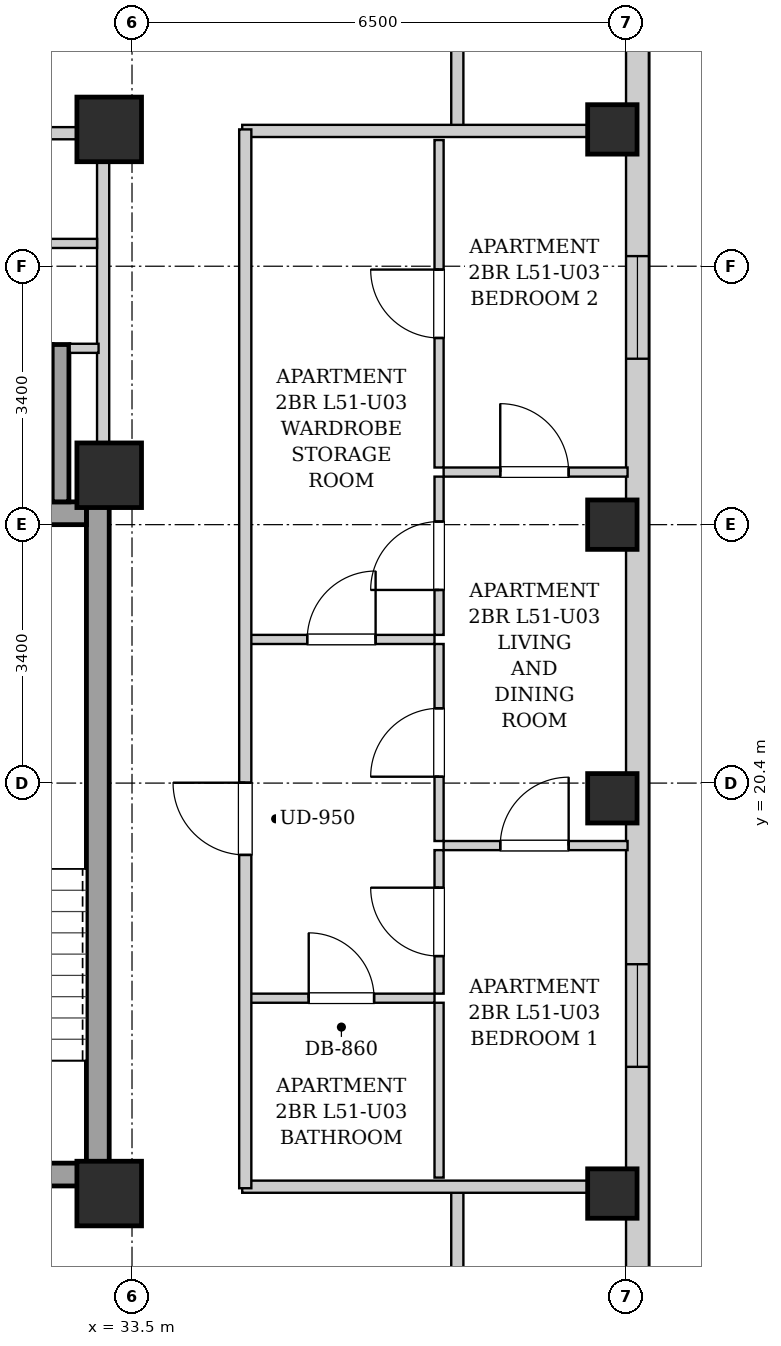
"""IFC4 building model, lengths in metres.
Left out: names, types, materials, properties, quantities, classifications, styles, units other than length and angle.
Written with IfcOpenShell. Run it as: python <this file> out.ifc"""

import sys

from ifc_helpers import new_model, si_unit, direction, frame, frame_2d, origin, origin_2d, place, context, subcontext, project, spatial, rectangle, extrude, element, fill, save


model = new_model("IFC4")
c1 = context("Model", 3, precision=1e-05, world=origin(), true_north=direction((0.0, 1.0)))
c2 = subcontext(c1, "Body", "Model", "MODEL_VIEW")
j1 = project(units=[si_unit("LENGTHUNIT", "METRE"), si_unit("PLANEANGLEUNIT", "RADIAN")], contexts=[c1])
p1 = place(None, origin())
s1 = spatial("IfcSite", under=j1, at=p1, CompositionType="ELEMENT")
p2 = place(p1, origin())
s2 = spatial("IfcBuilding", under=s1, at=p2, CompositionType="ELEMENT")
p3 = place(p2, frame((0.0, 0.0, 177.7)))
s3 = spatial("IfcBuildingStorey", under=s2, at=p3, CompositionType="ELEMENT", Elevation=177.7)
for number, where, z_axis, x_axis in (
    (1, (39.82, 15.0, 0.0), (0.0, 0.0, 1.0), (1.0, 0.0, 0.0)),
    (2, (39.82, 20.2, 0.0), (0.0, 0.0, 1.0), (1.0, 0.0, 0.0)),
    (3, (39.82, 23.8, 0.0), (0.0, 0.0, 1.0), (1.0, 0.0, 0.0)),
    (4, (39.82, 29.0, 0.0), (0.0, 0.0, 1.0), (1.0, 0.0, 0.0)),
):
    element("IfcColumn", number, at=place(p3, frame(where, z_axis=z_axis, x_axis=x_axis)), inside=s3, PredefinedType="COLUMN", context=c2, shape_type="SweptSolid", body=[
        extrude(rectangle(XDim=0.65, YDim=0.65, at=origin_2d()), origin(), (0.0, 0.0, 1.0), 3.3),
    ])
for number, where, z_axis, x_axis in (
    (5, (33.2, 15.0, 0.0), (0.0, 0.0, 1.0), (1.0, 0.0, 0.0)),
    (6, (33.2, 29.0, 0.0), (0.0, 0.0, 1.0), (1.0, 0.0, 0.0)),
    (7, (33.2, 24.45, 0.0), (0.0, 0.0, 1.0), (1.0, 0.0, 0.0)),
):
    element("IfcColumn", number, at=place(p3, frame(where, z_axis=z_axis, x_axis=x_axis)), inside=s3, PredefinedType="COLUMN", context=c2, shape_type="SweptSolid", body=[
        extrude(rectangle(XDim=0.85, YDim=0.85, at=origin_2d()), origin(), (0.0, 0.0, 1.0), 3.3),
    ])
p4 = place(p3, frame((40.15, 37.7, 0.0), z_axis=(0.0, 0.0, 1.0), x_axis=(0.0, -1.0, 0.0)))
e8 = element("IfcWall", 8, at=p4, inside=s3, PredefinedType="SOLIDWALL", context=c2, shape_type="SweptSolid", body=[
    extrude(rectangle(XDim=31.4, YDim=0.3, at=frame_2d((15.7, 0.0))), origin(), (0.0, 0.0, 1.0), 3.04),
])
p5 = place(p4, frame((28.396, 0.0, 0.55)))
e9 = element("IfcOpeningElement", 9, at=p5, cuts=e8, PredefinedType="OPENING", context=c2, shape_type="SweptSolid", body=[
    extrude(rectangle(XDim=1.35, YDim=1.2, at=frame_2d((0.675, 0.6))), frame((0.0, 0.16, 0.0), z_axis=(0.0, -1.0, 0.0), x_axis=(1.0, 0.0, 0.0)), (0.0, 0.0, 1.0), 0.32),
])
p6 = place(p4, frame((1.653, 0.0, 0.55)))
e10 = element("IfcOpeningElement", 10, at=p6, cuts=e8, PredefinedType="OPENING", context=c2, shape_type="SweptSolid", body=[
    extrude(rectangle(XDim=1.35, YDim=1.2, at=frame_2d((0.675, 0.6))), frame((0.0, 0.16, 0.0), z_axis=(0.0, -1.0, 0.0), x_axis=(1.0, 0.0, 0.0)), (0.0, 0.0, 1.0), 0.32),
])
p7 = place(p4, frame((19.683, 0.0, 0.55)))
e11 = element("IfcOpeningElement", 11, at=p7, cuts=e8, PredefinedType="OPENING", context=c2, shape_type="SweptSolid", body=[
    extrude(rectangle(XDim=1.35, YDim=1.2, at=frame_2d((0.675, 0.6))), frame((0.0, 0.16, 0.0), z_axis=(0.0, -1.0, 0.0), x_axis=(1.0, 0.0, 0.0)), (0.0, 0.0, 1.0), 0.32),
])
p8 = place(p4, frame((10.367, 0.0, 0.55)))
e12 = element("IfcOpeningElement", 12, at=p8, cuts=e8, PredefinedType="OPENING", context=c2, shape_type="SweptSolid", body=[
    extrude(rectangle(XDim=1.35, YDim=1.2, at=frame_2d((0.675, 0.6))), frame((0.0, 0.16, 0.0), z_axis=(0.0, -1.0, 0.0), x_axis=(1.0, 0.0, 0.0)), (0.0, 0.0, 1.0), 0.32),
])
p9 = place(p3, frame((33.05, 15.1, 0.0), z_axis=(0.0, 0.0, 1.0), x_axis=(0.0, 1.0, 0.0)))
e13 = element("IfcWall", 13, at=p9, inside=s3, PredefinedType="SHEAR", context=c2, shape_type="SweptSolid", body=[
    extrude(rectangle(XDim=9.0, YDim=0.3, at=frame_2d((4.5, 0.0))), origin(), (0.0, 0.0, 1.0), 3.04),
])
p10 = place(p3, frame((30.05, 23.95, 0.0), z_axis=(0.0, 0.0, 1.0), x_axis=(1.0, 0.0, 0.0)))
e14 = element("IfcWall", 14, at=p10, inside=s3, PredefinedType="SHEAR", context=c2, shape_type="SweptSolid", body=[
    extrude(rectangle(XDim=2.85, YDim=0.3, at=frame_2d((1.425, 0.0))), origin(), (0.0, 0.0, 1.0), 3.04),
])
p11 = place(p3, frame((30.05, 15.25, 0.0), z_axis=(0.0, 0.0, 1.0), x_axis=(1.0, 0.0, 0.0)))
e15 = element("IfcWall", 15, at=p11, inside=s3, PredefinedType="SHEAR", context=c2, shape_type="SweptSolid", body=[
    extrude(rectangle(XDim=2.85, YDim=0.3, at=frame_2d((1.425, 0.0))), origin(), (0.0, 0.0, 1.0), 3.04),
])
p12 = place(p11, frame((0.86, 0.0, 0.0)))
e16 = element("IfcOpeningElement", 16, at=p12, cuts=e15, PredefinedType="OPENING", context=c2, shape_type="SweptSolid", body=[
    extrude(rectangle(XDim=1.1, YDim=2.05, at=frame_2d((0.55, 1.025))), frame((0.0, 0.16, 0.0), z_axis=(0.0, -1.0, 0.0), x_axis=(1.0, 0.0, 0.0)), (0.0, 0.0, 1.0), 0.32),
])
p13 = place(p3, frame((32.56, 24.1, 0.0), z_axis=(0.0, 0.0, 1.0), x_axis=(0.0, 1.0, 0.0)))
e17 = element("IfcWall", 17, at=p13, inside=s3, PredefinedType="SHEAR", context=c2, shape_type="SweptSolid", body=[
    extrude(rectangle(XDim=2.07, YDim=0.22, at=frame_2d((1.035, 0.0))), origin(), (0.0, 0.0, 1.0), 3.04),
])
p14 = place(p3, frame((33.12, 24.12, 0.0), z_axis=(0.0, 0.0, 1.0), x_axis=(0.0, 1.0, 0.0)))
e18 = element("IfcWall", 18, at=p14, inside=s3, PredefinedType="PARTITIONING", context=c2, shape_type="SweptSolid", body=[
    extrude(rectangle(XDim=4.76, YDim=0.16, at=frame_2d((2.38, 0.0))), origin(), (0.0, 0.0, 1.0), 2.375),
])
p15 = place(p3, frame((32.68, 26.12, 0.0), z_axis=(0.0, 0.0, 1.0), x_axis=(1.0, 0.0, 0.0)))
e19 = element("IfcWall", 19, at=p15, inside=s3, PredefinedType="PARTITIONING", context=c2, shape_type="SweptSolid", body=[
    extrude(rectangle(XDim=0.38, YDim=0.12, at=frame_2d((0.19, 0.0))), origin(), (0.0, 0.0, 1.0), 3.04),
])
p16 = place(p3, frame((30.12, 27.5, 0.0), z_axis=(0.0, 0.0, 1.0), x_axis=(1.0, 0.0, 0.0)))
e20 = element("IfcWall", 20, at=p16, inside=s3, PredefinedType="PARTITIONING", context=c2, shape_type="SweptSolid", body=[
    extrude(rectangle(XDim=2.92, YDim=0.12, at=frame_2d((1.46, 0.0))), origin(), (0.0, 0.0, 1.0), 3.04),
])
p17 = place(p16, frame((0.97, 0.0, 0.0)))
e21 = element("IfcOpeningElement", 21, at=p17, cuts=e20, PredefinedType="OPENING", context=c2, shape_type="SweptSolid", body=[
    extrude(rectangle(XDim=0.86, YDim=2.05, at=frame_2d((0.43, 1.025))), frame((0.0, 0.07, 0.0), z_axis=(0.0, -1.0, 0.0), x_axis=(1.0, 0.0, 0.0)), (0.0, 0.0, 1.0), 0.14),
])
p18 = place(p3, frame((25.72, 28.95, 0.0), z_axis=(0.0, 0.0, 1.0), x_axis=(1.0, 0.0, 0.0)))
e22 = element("IfcWall", 22, at=p18, inside=s3, PredefinedType="PARTITIONING", context=c2, shape_type="SweptSolid", body=[
    extrude(rectangle(XDim=7.32, YDim=0.16, at=frame_2d((3.66, 0.0))), origin(), (0.0, 0.0, 1.0), 2.556),
])
p19 = place(p18, frame((1.27, 0.0, 0.0)))
e23 = element("IfcOpeningElement", 23, at=p19, cuts=e22, PredefinedType="OPENING", context=c2, shape_type="SweptSolid", body=[
    extrude(rectangle(XDim=0.86, YDim=2.05, at=frame_2d((0.43, 1.025))), frame((0.0, 0.09, 0.0), z_axis=(0.0, -1.0, 0.0), x_axis=(1.0, 0.0, 0.0)), (0.0, 0.0, 1.0), 0.18),
])
for number, where, z_axis, x_axis in (
    (24, (37.78, 13.51, 0.0), (0.0, 0.0, 1.0), (0.0, 1.0, 0.0)),
    (25, (37.78, 28.98, 0.0), (0.0, 0.0, 1.0), (0.0, 1.0, 0.0)),
):
    element("IfcWall", number, at=place(p3, frame(where, z_axis=z_axis, x_axis=x_axis)), inside=s3, PredefinedType="PARTITIONING", context=c2, shape_type="SweptSolid", body=[
        extrude(rectangle(XDim=1.58, YDim=0.16, at=frame_2d((0.79, 0.0))), origin(), (0.0, 0.0, 1.0), 3.04),
    ])
for number, where, z_axis, x_axis in (
    (26, (34.95, 15.09, 0.0), (0.0, 0.0, 1.0), (1.0, 0.0, 0.0)),
    (27, (34.95, 28.98, 0.0), (0.0, 0.0, 1.0), (1.0, 0.0, 0.0)),
):
    element("IfcWall", number, at=place(p3, frame(where, z_axis=z_axis, x_axis=x_axis)), inside=s3, PredefinedType="PARTITIONING", context=c2, shape_type="SweptSolid", body=[
        extrude(rectangle(XDim=5.07, YDim=0.16, at=frame_2d((2.535, 0.0))), origin(), (0.0, 0.0, 1.0), 2.556),
    ])
p20 = place(p3, frame((35.03, 22.29, 0.0), z_axis=(0.0, 0.0, 1.0), x_axis=(1.0, 0.0, 0.0)))
e28 = element("IfcWall", 28, at=p20, inside=s3, PredefinedType="PARTITIONING", context=c2, shape_type="SweptSolid", body=[
    extrude(rectangle(XDim=2.45, YDim=0.12, at=frame_2d((1.225, 0.0))), origin(), (0.0, 0.0, 1.0), 3.04),
])
p21 = place(p20, frame((0.775, 0.0, 0.0)))
e29 = element("IfcOpeningElement", 29, at=p21, cuts=e28, PredefinedType="OPENING", context=c2, shape_type="SweptSolid", body=[
    extrude(rectangle(XDim=0.9, YDim=2.05, at=frame_2d((0.45, 1.025))), frame((0.0, 0.07, 0.0), z_axis=(0.0, -1.0, 0.0), x_axis=(1.0, 0.0, 0.0)), (0.0, 0.0, 1.0), 0.14),
])
p22 = place(p3, frame((37.54, 22.35, 0.0), z_axis=(0.0, 0.0, 1.0), x_axis=(0.0, 1.0, 0.0)))
e30 = element("IfcWall", 30, at=p22, inside=s3, PredefinedType="PARTITIONING", context=c2, shape_type="SweptSolid", body=[
    extrude(rectangle(XDim=2.082, YDim=0.12, at=frame_2d((1.041, 0.0))), origin(), (0.0, 0.0, 1.0), 3.04),
])
p23 = place(p22, frame((0.591, 0.0, 0.0)))
e31 = element("IfcOpeningElement", 31, at=p23, cuts=e30, PredefinedType="OPENING", context=c2, shape_type="SweptSolid", body=[
    extrude(rectangle(XDim=0.9, YDim=2.05, at=frame_2d((0.45, 1.025))), frame((0.0, 0.07, 0.0), z_axis=(0.0, -1.0, 0.0), x_axis=(1.0, 0.0, 0.0)), (0.0, 0.0, 1.0), 0.14),
])
p24 = place(p3, frame((37.54, 24.552, 0.0), z_axis=(0.0, 0.0, 1.0), x_axis=(0.0, 1.0, 0.0)))
e32 = element("IfcWall", 32, at=p24, inside=s3, PredefinedType="PARTITIONING", context=c2, shape_type="SweptSolid", body=[
    extrude(rectangle(XDim=4.308, YDim=0.12, at=frame_2d((2.154, 0.0))), origin(), (0.0, 0.0, 1.0), 3.04),
])
p25 = place(p24, frame((1.704, 0.0, 0.0)))
e33 = element("IfcOpeningElement", 33, at=p25, cuts=e32, PredefinedType="OPENING", context=c2, shape_type="SweptSolid", body=[
    extrude(rectangle(XDim=0.9, YDim=2.05, at=frame_2d((0.45, 1.025))), frame((0.0, 0.07, 0.0), z_axis=(0.0, -1.0, 0.0), x_axis=(1.0, 0.0, 0.0)), (0.0, 0.0, 1.0), 0.14),
])
p26 = place(p3, frame((35.03, 17.57, 0.0), z_axis=(0.0, 0.0, 1.0), x_axis=(1.0, 0.0, 0.0)))
e34 = element("IfcWall", 34, at=p26, inside=s3, PredefinedType="PARTITIONING", context=c2, shape_type="SweptSolid", body=[
    extrude(rectangle(XDim=2.45, YDim=0.12, at=frame_2d((1.225, 0.0))), origin(), (0.0, 0.0, 1.0), 3.04),
])
p27 = place(p26, frame((0.795, 0.0, 0.0)))
e35 = element("IfcOpeningElement", 35, at=p27, cuts=e34, PredefinedType="OPENING", context=c2, shape_type="SweptSolid", body=[
    extrude(rectangle(XDim=0.86, YDim=2.05, at=frame_2d((0.43, 1.025))), frame((0.0, 0.07, 0.0), z_axis=(0.0, -1.0, 0.0), x_axis=(1.0, 0.0, 0.0)), (0.0, 0.0, 1.0), 0.14),
])
p28 = place(p3, frame((37.54, 15.21, 0.0), z_axis=(0.0, 0.0, 1.0), x_axis=(0.0, 1.0, 0.0)))
e36 = element("IfcWall", 36, at=p28, inside=s3, PredefinedType="PARTITIONING", context=c2, shape_type="SweptSolid", body=[
    extrude(rectangle(XDim=2.3, YDim=0.12, at=frame_2d((1.15, 0.0))), origin(), (0.0, 0.0, 1.0), 3.04),
])
p29 = place(p3, frame((37.54, 17.63, 0.0), z_axis=(0.0, 0.0, 1.0), x_axis=(0.0, 1.0, 0.0)))
e37 = element("IfcWall", 37, at=p29, inside=s3, PredefinedType="PARTITIONING", context=c2, shape_type="SweptSolid", body=[
    extrude(rectangle(XDim=1.888, YDim=0.12, at=frame_2d((0.944, 0.0))), origin(), (0.0, 0.0, 1.0), 3.04),
])
p30 = place(p29, frame((0.494, 0.0, 0.0)))
e38 = element("IfcOpeningElement", 38, at=p30, cuts=e37, PredefinedType="OPENING", context=c2, shape_type="SweptSolid", body=[
    extrude(rectangle(XDim=0.9, YDim=2.05, at=frame_2d((0.45, 1.025))), frame((0.0, 0.07, 0.0), z_axis=(0.0, -1.0, 0.0), x_axis=(1.0, 0.0, 0.0)), (0.0, 0.0, 1.0), 0.14),
])
p31 = place(p3, frame((37.54, 19.638, 0.0), z_axis=(0.0, 0.0, 1.0), x_axis=(0.0, 1.0, 0.0)))
e39 = element("IfcWall", 39, at=p31, inside=s3, PredefinedType="PARTITIONING", context=c2, shape_type="SweptSolid", body=[
    extrude(rectangle(XDim=2.592, YDim=0.12, at=frame_2d((1.296, 0.0))), origin(), (0.0, 0.0, 1.0), 3.04),
])
p32 = place(p31, frame((0.846, 0.0, 0.0)))
e40 = element("IfcOpeningElement", 40, at=p32, cuts=e39, PredefinedType="OPENING", context=c2, shape_type="SweptSolid", body=[
    extrude(rectangle(XDim=0.9, YDim=2.05, at=frame_2d((0.45, 1.025))), frame((0.0, 0.07, 0.0), z_axis=(0.0, -1.0, 0.0), x_axis=(1.0, 0.0, 0.0)), (0.0, 0.0, 1.0), 0.14),
])
p33 = place(p3, frame((37.6, 19.578, 0.0), z_axis=(0.0, 0.0, 1.0), x_axis=(1.0, 0.0, 0.0)))
e41 = element("IfcWall", 41, at=p33, inside=s3, PredefinedType="PARTITIONING", context=c2, shape_type="SweptSolid", body=[
    extrude(rectangle(XDim=2.42, YDim=0.12, at=frame_2d((1.21, 0.0))), origin(), (0.0, 0.0, 1.0), 3.04),
])
p34 = place(p33, frame((0.745, 0.0, 0.0)))
e42 = element("IfcOpeningElement", 42, at=p34, cuts=e41, PredefinedType="OPENING", context=c2, shape_type="SweptSolid", body=[
    extrude(rectangle(XDim=0.9, YDim=2.05, at=frame_2d((0.45, 1.025))), frame((0.0, 0.07, 0.0), z_axis=(0.0, -1.0, 0.0), x_axis=(1.0, 0.0, 0.0)), (0.0, 0.0, 1.0), 0.14),
])
p35 = place(p3, frame((37.6, 24.492, 0.0), z_axis=(0.0, 0.0, 1.0), x_axis=(1.0, 0.0, 0.0)))
e43 = element("IfcWall", 43, at=p35, inside=s3, PredefinedType="PARTITIONING", context=c2, shape_type="SweptSolid", body=[
    extrude(rectangle(XDim=2.42, YDim=0.12, at=frame_2d((1.21, 0.0))), origin(), (0.0, 0.0, 1.0), 2.722),
])
p36 = place(p35, frame((0.745, 0.0, 0.0)))
e44 = element("IfcOpeningElement", 44, at=p36, cuts=e43, PredefinedType="OPENING", context=c2, shape_type="SweptSolid", body=[
    extrude(rectangle(XDim=0.9, YDim=2.05, at=frame_2d((0.45, 1.025))), frame((0.0, 0.07, 0.0), z_axis=(0.0, -1.0, 0.0), x_axis=(1.0, 0.0, 0.0)), (0.0, 0.0, 1.0), 0.14),
])
p37 = place(p3, frame((34.99, 15.07, 0.0), z_axis=(0.0, 0.0, 1.0), x_axis=(0.0, 1.0, 0.0)))
e45 = element("IfcWall", 45, at=p37, inside=s3, PredefinedType="PARTITIONING", context=c2, shape_type="SweptSolid", body=[
    extrude(rectangle(XDim=13.93, YDim=0.16, at=frame_2d((6.965, 0.0))), origin(), (0.0, 0.0, 1.0), 3.04),
])
p38 = place(p37, frame((4.385, 0.0, 0.0)))
e46 = element("IfcOpeningElement", 46, at=p38, cuts=e45, PredefinedType="OPENING", context=c2, shape_type="SweptSolid", body=[
    extrude(rectangle(XDim=0.95, YDim=2.1, at=frame_2d((0.475, 1.05))), frame((0.0, 0.09, 0.0), z_axis=(0.0, -1.0, 0.0), x_axis=(1.0, 0.0, 0.0)), (0.0, 0.0, 1.0), 0.18),
])
p39 = place(p21, origin())
e47 = element("IfcDoor", 47, at=p39, inside=s3, OperationType="SINGLE_SWING_RIGHT", PredefinedType="DOOR", context=c2, shape_type="SweptSolid", body=[
    extrude(rectangle(XDim=0.9, YDim=2.05, at=frame_2d((0.45, 1.025))), frame((0.0, 0.025, 0.0), z_axis=(0.0, -1.0, 0.0), x_axis=(1.0, 0.0, 0.0)), (0.0, 0.0, 1.0), 0.05),
])
fill(e29, e47)
p40 = place(p23, origin())
e48 = element("IfcDoor", 48, at=p40, inside=s3, OperationType="SINGLE_SWING_LEFT", PredefinedType="DOOR", context=c2, shape_type="SweptSolid", body=[
    extrude(rectangle(XDim=0.9, YDim=2.05, at=frame_2d((0.45, 1.025))), frame((0.0, 0.025, 0.0), z_axis=(0.0, -1.0, 0.0), x_axis=(1.0, 0.0, 0.0)), (0.0, 0.0, 1.0), 0.05),
])
fill(e31, e48)
p41 = place(p25, origin())
e49 = element("IfcDoor", 49, at=p41, inside=s3, OperationType="SINGLE_SWING_RIGHT", PredefinedType="DOOR", context=c2, shape_type="SweptSolid", body=[
    extrude(rectangle(XDim=0.9, YDim=2.05, at=frame_2d((0.45, 1.025))), frame((0.0, 0.025, 0.0), z_axis=(0.0, -1.0, 0.0), x_axis=(1.0, 0.0, 0.0)), (0.0, 0.0, 1.0), 0.05),
])
fill(e33, e49)
p42 = place(p27, origin())
e50 = element("IfcDoor", 50, at=p42, inside=s3, OperationType="SINGLE_SWING_LEFT", PredefinedType="DOOR", context=c2, shape_type="SweptSolid", body=[
    extrude(rectangle(XDim=0.86, YDim=2.05, at=frame_2d((0.43, 1.025))), frame((0.0, 0.025, 0.0), z_axis=(0.0, -1.0, 0.0), x_axis=(1.0, 0.0, 0.0)), (0.0, 0.0, 1.0), 0.05),
])
fill(e35, e50)
p43 = place(p30, origin())
e51 = element("IfcDoor", 51, at=p43, inside=s3, OperationType="SINGLE_SWING_RIGHT", PredefinedType="DOOR", context=c2, shape_type="SweptSolid", body=[
    extrude(rectangle(XDim=0.9, YDim=2.05, at=frame_2d((0.45, 1.025))), frame((0.0, 0.025, 0.0), z_axis=(0.0, -1.0, 0.0), x_axis=(1.0, 0.0, 0.0)), (0.0, 0.0, 1.0), 0.05),
])
fill(e38, e51)
p44 = place(p32, origin())
e52 = element("IfcDoor", 52, at=p44, inside=s3, OperationType="SINGLE_SWING_LEFT", PredefinedType="DOOR", context=c2, shape_type="SweptSolid", body=[
    extrude(rectangle(XDim=0.9, YDim=2.05, at=frame_2d((0.45, 1.025))), frame((0.0, 0.025, 0.0), z_axis=(0.0, -1.0, 0.0), x_axis=(1.0, 0.0, 0.0)), (0.0, 0.0, 1.0), 0.05),
])
fill(e40, e52)
p45 = place(p34, origin())
e53 = element("IfcDoor", 53, at=p45, inside=s3, OperationType="SINGLE_SWING_RIGHT", PredefinedType="DOOR", context=c2, shape_type="SweptSolid", body=[
    extrude(rectangle(XDim=0.9, YDim=2.05, at=frame_2d((0.45, 1.025))), frame((0.0, 0.025, 0.0), z_axis=(0.0, -1.0, 0.0), x_axis=(1.0, 0.0, 0.0)), (0.0, 0.0, 1.0), 0.05),
])
fill(e42, e53)
p46 = place(p36, origin())
e54 = element("IfcDoor", 54, at=p46, inside=s3, OperationType="SINGLE_SWING_LEFT", PredefinedType="DOOR", context=c2, shape_type="SweptSolid", body=[
    extrude(rectangle(XDim=0.9, YDim=2.05, at=frame_2d((0.45, 1.025))), frame((0.0, 0.025, 0.0), z_axis=(0.0, -1.0, 0.0), x_axis=(1.0, 0.0, 0.0)), (0.0, 0.0, 1.0), 0.05),
])
fill(e44, e54)
p47 = place(p38, origin())
e55 = element("IfcDoor", 55, at=p47, inside=s3, OperationType="SINGLE_SWING_RIGHT", PredefinedType="DOOR", context=c2, shape_type="SweptSolid", body=[
    extrude(rectangle(XDim=0.95, YDim=2.1, at=frame_2d((0.475, 1.05))), frame((0.0, 0.025, 0.0), z_axis=(0.0, -1.0, 0.0), x_axis=(1.0, 0.0, 0.0)), (0.0, 0.0, 1.0), 0.05),
])
fill(e46, e55)
p48 = place(p7, origin())
e56 = element("IfcWindow", 56, at=p48, inside=s3, PartitioningType="SINGLE_PANEL", PredefinedType="WINDOW", context=c2, shape_type="SweptSolid", body=[
    extrude(rectangle(XDim=1.35, YDim=1.2, at=frame_2d((0.675, 0.6))), frame((0.0, 0.03, 0.0), z_axis=(0.0, -1.0, 0.0), x_axis=(1.0, 0.0, 0.0)), (0.0, 0.0, 1.0), 0.06),
])
fill(e11, e56)
p49 = place(p8, origin())
e57 = element("IfcWindow", 57, at=p49, inside=s3, PartitioningType="SINGLE_PANEL", PredefinedType="WINDOW", context=c2, shape_type="SweptSolid", body=[
    extrude(rectangle(XDim=1.35, YDim=1.2, at=frame_2d((0.675, 0.6))), frame((0.0, 0.03, 0.0), z_axis=(0.0, -1.0, 0.0), x_axis=(1.0, 0.0, 0.0)), (0.0, 0.0, 1.0), 0.06),
])
fill(e12, e57)
save(model, sys.argv[1])
